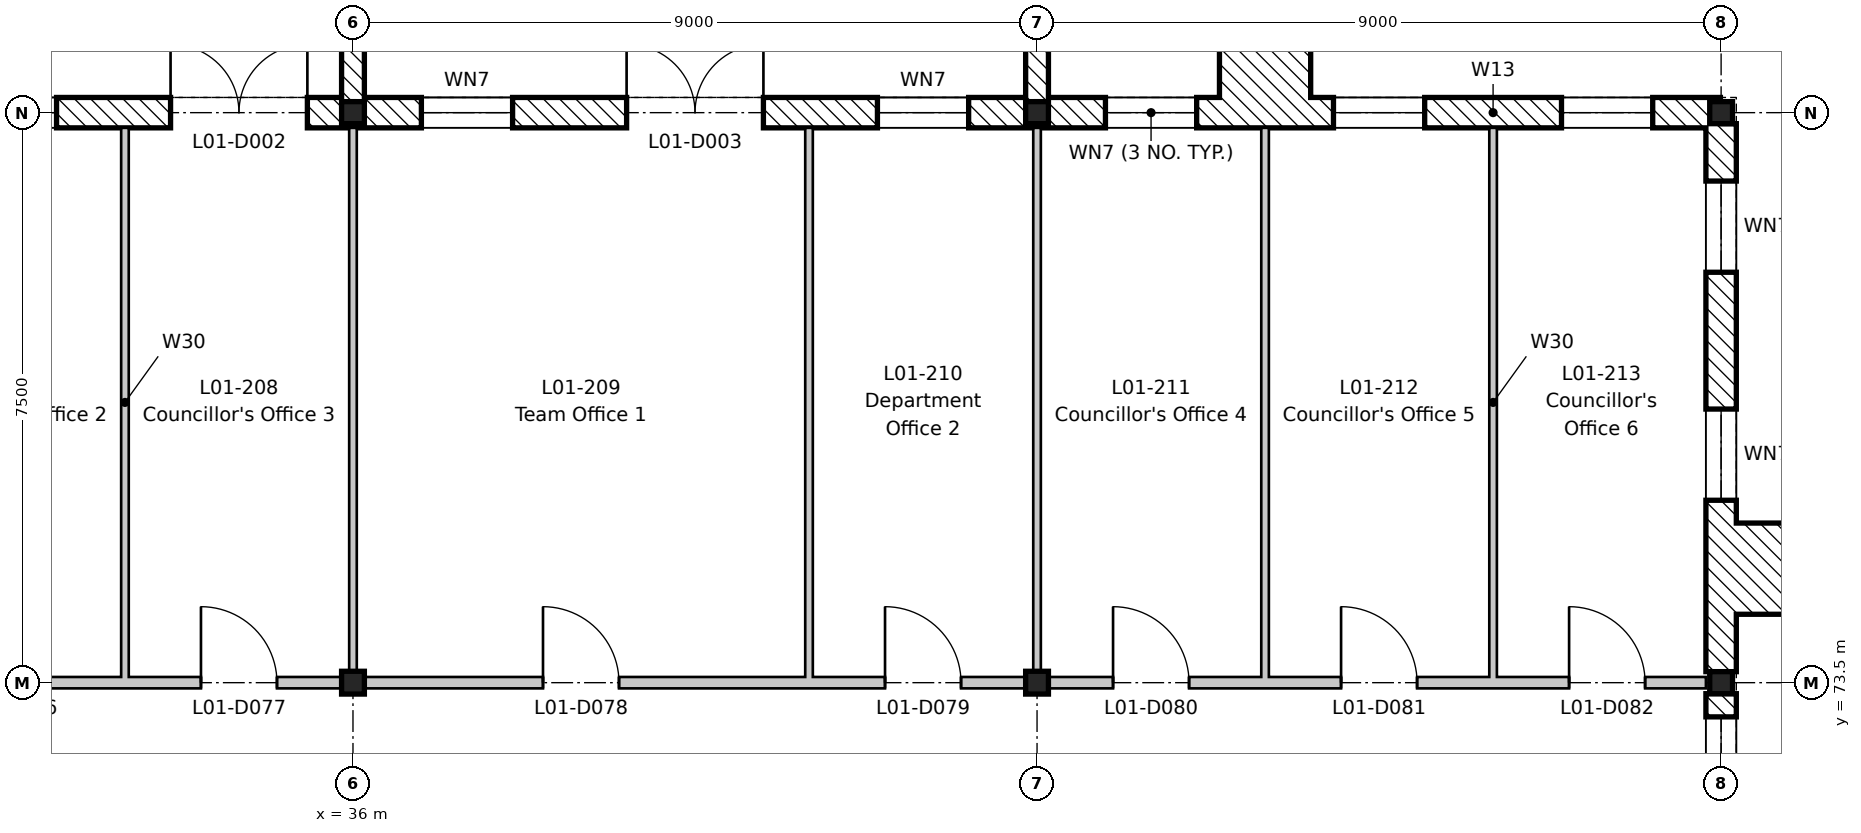
"""IFC4 building model, lengths in metres.
Left out: names, types, materials, properties, quantities, classifications, styles, units other than length and angle.
Written with IfcOpenShell. Run it as: python <this file> out.ifc"""

import sys

from ifc_helpers import new_model, si_unit, direction, frame, frame_2d, origin, origin_2d, place, context, subcontext, project, spatial, rectangle, i_section, extrude, element, fill, save


model = new_model("IFC4")
c1 = context("Model", 3, precision=1e-05, world=origin(), true_north=direction((0.0, 1.0)))
c2 = subcontext(c1, "Body", "Model", "MODEL_VIEW")
j1 = project(units=[si_unit("LENGTHUNIT", "METRE"), si_unit("PLANEANGLEUNIT", "RADIAN")], contexts=[c1])
p1 = place(None, origin())
s1 = spatial("IfcSite", under=j1, at=p1, CompositionType="ELEMENT")
p2 = place(p1, origin())
s2 = spatial("IfcBuilding", under=s1, at=p2, CompositionType="ELEMENT")
p3 = place(p2, frame((0.0, 0.0, 5.4)))
s3 = spatial("IfcBuildingStorey", under=s2, at=p3, CompositionType="ELEMENT", Elevation=5.4)
p4 = place(p3, frame((36.0, 73.5, -0.2), z_axis=(0.0, 0.0, 1.0), x_axis=(1.0, 0.0, 0.0)))
e1 = element("IfcColumn", 1, at=p4, inside=s3, PredefinedType="COLUMN", context=c2, shape_type="SweptSolid", body=[
    extrude(i_section(OverallWidth=0.3, OverallDepth=0.3, WebThickness=0.011, FlangeThickness=0.019, FilletRadius=0.027, at=origin_2d()), origin(), (0.0, 0.0, 1.0), 4.5),
])
p5 = place(p3, frame((36.0, 81.0, -0.2), z_axis=(0.0, 0.0, 1.0), x_axis=(1.0, 0.0, 0.0)))
e2 = element("IfcColumn", 2, at=p5, inside=s3, PredefinedType="COLUMN", context=c2, shape_type="SweptSolid", body=[
    extrude(i_section(OverallWidth=0.3, OverallDepth=0.29, WebThickness=0.009, FlangeThickness=0.014, FilletRadius=0.027, at=origin_2d()), origin(), (0.0, 0.0, 1.0), 4.5),
])
p6 = place(p3, frame((45.0, 73.5, -0.2), z_axis=(0.0, 0.0, 1.0), x_axis=(1.0, 0.0, 0.0)))
e3 = element("IfcColumn", 3, at=p6, inside=s3, PredefinedType="COLUMN", context=c2, shape_type="SweptSolid", body=[
    extrude(i_section(OverallWidth=0.3, OverallDepth=0.3, WebThickness=0.011, FlangeThickness=0.019, FilletRadius=0.027, at=origin_2d()), origin(), (0.0, 0.0, 1.0), 4.5),
])
for number, where, z_axis, x_axis in (
    (4, (45.0, 81.0, -0.2), (0.0, 0.0, 1.0), (1.0, 0.0, 0.0)),
    (5, (54.0, 73.5, -0.2), (0.0, 0.0, 1.0), (1.0, 0.0, 0.0)),
    (6, (54.0, 81.0, -0.2), (0.0, 0.0, 1.0), (1.0, 0.0, 0.0)),
):
    element("IfcColumn", number, at=place(p3, frame(where, z_axis=z_axis, x_axis=x_axis)), inside=s3, PredefinedType="COLUMN", context=c2, shape_type="SweptSolid", body=[
        extrude(i_section(OverallWidth=0.3, OverallDepth=0.29, WebThickness=0.009, FlangeThickness=0.014, FilletRadius=0.027, at=origin_2d()), origin(), (0.0, 0.0, 1.0), 4.5),
    ])
p7 = place(p3, frame((27.009, 81.0, 0.0), z_axis=(0.0, 0.0, 1.0), x_axis=(1.0, 0.0, 0.0)))
e7 = element("IfcWall", 7, at=p7, inside=s3, PredefinedType="STANDARD", context=c2, shape_type="SweptSolid", body=[
    extrude(rectangle(XDim=8.981, YDim=0.4, at=frame_2d((4.491, 0.0))), origin(), (0.0, 0.0, 1.0), 3.9),
])
p8 = place(p7, frame((6.591, 0.0, 0.0)))
e8 = element("IfcOpeningElement", 8, at=p8, cuts=e7, PredefinedType="OPENING", context=c2, shape_type="SweptSolid", body=[
    extrude(rectangle(XDim=1.8, YDim=2.4, at=frame_2d((0.9, 1.2))), frame((0.0, 0.21, 0.0), z_axis=(0.0, -1.0, 0.0), x_axis=(1.0, 0.0, 0.0)), (0.0, 0.0, 1.0), 0.42),
])
p9 = place(p7, frame((0.891, 0.0, 0.9)))
e9 = element("IfcOpeningElement", 9, at=p9, cuts=e7, PredefinedType="OPENING", context=c2, shape_type="SweptSolid", body=[
    extrude(rectangle(XDim=1.2, YDim=2.4, at=frame_2d((0.6, 1.2))), frame((0.0, 0.21, 0.0), z_axis=(0.0, -1.0, 0.0), x_axis=(1.0, 0.0, 0.0)), (0.0, 0.0, 1.0), 0.42),
])
p10 = place(p7, frame((3.891, 0.0, 0.9)))
e10 = element("IfcOpeningElement", 10, at=p10, cuts=e7, PredefinedType="OPENING", context=c2, shape_type="SweptSolid", body=[
    extrude(rectangle(XDim=1.2, YDim=2.4, at=frame_2d((0.6, 1.2))), frame((0.0, 0.21, 0.0), z_axis=(0.0, -1.0, 0.0), x_axis=(1.0, 0.0, 0.0)), (0.0, 0.0, 1.0), 0.42),
])
p11 = place(p3, frame((36.009, 81.0, 0.0), z_axis=(0.0, 0.0, 1.0), x_axis=(1.0, 0.0, 0.0)))
e11 = element("IfcWall", 11, at=p11, inside=s3, PredefinedType="STANDARD", context=c2, shape_type="SweptSolid", body=[
    extrude(rectangle(XDim=8.981, YDim=0.4, at=frame_2d((4.491, 0.0))), origin(), (0.0, 0.0, 1.0), 3.9),
])
p12 = place(p11, frame((3.591, 0.0, 0.0)))
e12 = element("IfcOpeningElement", 12, at=p12, cuts=e11, PredefinedType="OPENING", context=c2, shape_type="SweptSolid", body=[
    extrude(rectangle(XDim=1.8, YDim=2.4, at=frame_2d((0.9, 1.2))), frame((0.0, 0.21, 0.0), z_axis=(0.0, -1.0, 0.0), x_axis=(1.0, 0.0, 0.0)), (0.0, 0.0, 1.0), 0.42),
])
p13 = place(p11, frame((0.891, 0.0, 0.9)))
e13 = element("IfcOpeningElement", 13, at=p13, cuts=e11, PredefinedType="OPENING", context=c2, shape_type="SweptSolid", body=[
    extrude(rectangle(XDim=1.2, YDim=2.4, at=frame_2d((0.6, 1.2))), frame((0.0, 0.21, 0.0), z_axis=(0.0, -1.0, 0.0), x_axis=(1.0, 0.0, 0.0)), (0.0, 0.0, 1.0), 0.42),
])
p14 = place(p11, frame((6.891, 0.0, 0.9)))
e14 = element("IfcOpeningElement", 14, at=p14, cuts=e11, PredefinedType="OPENING", context=c2, shape_type="SweptSolid", body=[
    extrude(rectangle(XDim=1.2, YDim=2.4, at=frame_2d((0.6, 1.2))), frame((0.0, 0.21, 0.0), z_axis=(0.0, -1.0, 0.0), x_axis=(1.0, 0.0, 0.0)), (0.0, 0.0, 1.0), 0.42),
])
p15 = place(p3, frame((45.009, 81.0, 0.0), z_axis=(0.0, 0.0, 1.0), x_axis=(1.0, 0.0, 0.0)))
e15 = element("IfcWall", 15, at=p15, inside=s3, PredefinedType="STANDARD", context=c2, shape_type="SweptSolid", body=[
    extrude(rectangle(XDim=8.981, YDim=0.4, at=frame_2d((4.491, 0.0))), origin(), (0.0, 0.0, 1.0), 3.9),
])
p16 = place(p15, frame((0.891, 0.0, 0.9)))
e16 = element("IfcOpeningElement", 16, at=p16, cuts=e15, PredefinedType="OPENING", context=c2, shape_type="SweptSolid", body=[
    extrude(rectangle(XDim=1.2, YDim=2.4, at=frame_2d((0.6, 1.2))), frame((0.0, 0.21, 0.0), z_axis=(0.0, -1.0, 0.0), x_axis=(1.0, 0.0, 0.0)), (0.0, 0.0, 1.0), 0.42),
])
p17 = place(p15, frame((3.891, 0.0, 0.9)))
e17 = element("IfcOpeningElement", 17, at=p17, cuts=e15, PredefinedType="OPENING", context=c2, shape_type="SweptSolid", body=[
    extrude(rectangle(XDim=1.2, YDim=2.4, at=frame_2d((0.6, 1.2))), frame((0.0, 0.21, 0.0), z_axis=(0.0, -1.0, 0.0), x_axis=(1.0, 0.0, 0.0)), (0.0, 0.0, 1.0), 0.42),
])
p18 = place(p15, frame((6.891, 0.0, 0.9)))
e18 = element("IfcOpeningElement", 18, at=p18, cuts=e15, PredefinedType="OPENING", context=c2, shape_type="SweptSolid", body=[
    extrude(rectangle(XDim=1.2, YDim=2.4, at=frame_2d((0.6, 1.2))), frame((0.0, 0.21, 0.0), z_axis=(0.0, -1.0, 0.0), x_axis=(1.0, 0.0, 0.0)), (0.0, 0.0, 1.0), 0.42),
])
p19 = place(p3, frame((54.0, 73.355, 0.0), z_axis=(0.0, 0.0, 1.0), x_axis=(0.0, -1.0, 0.0)))
e19 = element("IfcWall", 19, at=p19, inside=s3, PredefinedType="STANDARD", context=c2, shape_type="SweptSolid", body=[
    extrude(rectangle(XDim=2.71, YDim=0.4, at=frame_2d((1.355, 0.0))), origin(), (0.0, 0.0, 1.0), 4.1),
])
p20 = place(p19, frame((0.305, 0.0, 0.9)))
e20 = element("IfcOpeningElement", 20, at=p20, cuts=e19, PredefinedType="OPENING", context=c2, shape_type="SweptSolid", body=[
    extrude(rectangle(XDim=2.1, YDim=2.1, at=frame_2d((1.05, 1.05))), frame((0.0, 0.21, 0.0), z_axis=(0.0, -1.0, 0.0), x_axis=(1.0, 0.0, 0.0)), (0.0, 0.0, 1.0), 0.42),
])
p21 = place(p3, frame((54.0, 80.855, 0.0), z_axis=(0.0, 0.0, 1.0), x_axis=(0.0, -1.0, 0.0)))
e21 = element("IfcWall", 21, at=p21, inside=s3, PredefinedType="STANDARD", context=c2, shape_type="SweptSolid", body=[
    extrude(rectangle(XDim=7.21, YDim=0.4, at=frame_2d((3.605, 0.0))), origin(), (0.0, 0.0, 1.0), 3.97),
])
p22 = place(p21, frame((3.755, 0.0, 0.9)))
e22 = element("IfcOpeningElement", 22, at=p22, cuts=e21, PredefinedType="OPENING", context=c2, shape_type="SweptSolid", body=[
    extrude(rectangle(XDim=1.2, YDim=2.4, at=frame_2d((0.6, 1.2))), frame((0.0, 0.21, 0.0), z_axis=(0.0, -1.0, 0.0), x_axis=(1.0, 0.0, 0.0)), (0.0, 0.0, 1.0), 0.42),
])
p23 = place(p21, frame((0.755, 0.0, 0.9)))
e23 = element("IfcOpeningElement", 23, at=p23, cuts=e21, PredefinedType="OPENING", context=c2, shape_type="SweptSolid", body=[
    extrude(rectangle(XDim=1.2, YDim=2.4, at=frame_2d((0.6, 1.2))), frame((0.0, 0.21, 0.0), z_axis=(0.0, -1.0, 0.0), x_axis=(1.0, 0.0, 0.0)), (0.0, 0.0, 1.0), 0.42),
])
for number, where, z_axis, x_axis in (
    (24, (47.4, 81.8, 0.0), (0.0, 0.0, 1.0), (1.0, 0.0, 0.0)),
    (25, (54.8, 74.4, 0.0), (0.0, 0.0, 1.0), (0.0, 1.0, 0.0)),
):
    element("IfcWall", number, at=place(p3, frame(where, z_axis=z_axis, x_axis=x_axis)), inside=s3, PredefinedType="STANDARD", context=c2, shape_type="SweptSolid", body=[
        extrude(rectangle(XDim=1.2, YDim=1.2, at=frame_2d((0.6, 0.0))), origin(), (0.0, 0.0, 1.0), 4.5),
    ])
for number, where, z_axis, x_axis in (
    (26, (36.0, 81.145, 0.0), (0.0, 0.0, 1.0), (0.0, 1.0, 0.0)),
    (27, (45.0, 81.145, 0.0), (0.0, 0.0, 1.0), (0.0, 1.0, 0.0)),
):
    element("IfcWall", number, at=place(p3, frame(where, z_axis=z_axis, x_axis=x_axis)), inside=s3, PredefinedType="STANDARD", context=c2, shape_type="SweptSolid", body=[
        extrude(rectangle(XDim=2.855, YDim=0.3, at=frame_2d((1.427, 0.0))), origin(), (0.0, 0.0, 1.0), 3.97),
    ])
p24 = place(p3, frame((33.0, 73.575, 0.0), z_axis=(0.0, 0.0, 1.0), x_axis=(0.0, 1.0, 0.0)))
e28 = element("IfcWall", 28, at=p24, inside=s3, PredefinedType="PARTITIONING", context=c2, shape_type="SweptSolid", body=[
    extrude(rectangle(XDim=7.225, YDim=0.1, at=frame_2d((3.613, 0.0))), origin(), (0.0, 0.0, 1.0), 4.3),
])
p25 = place(p3, frame((36.0, 73.575, 0.0), z_axis=(0.0, 0.0, 1.0), x_axis=(0.0, 1.0, 0.0)))
e29 = element("IfcWall", 29, at=p25, inside=s3, PredefinedType="PARTITIONING", context=c2, shape_type="SweptSolid", body=[
    extrude(rectangle(XDim=7.225, YDim=0.1, at=frame_2d((3.613, 0.0))), origin(), (0.0, 0.0, 1.0), 3.95),
])
p26 = place(p3, frame((42.0, 73.575, 0.0), z_axis=(0.0, 0.0, 1.0), x_axis=(0.0, 1.0, 0.0)))
e30 = element("IfcWall", 30, at=p26, inside=s3, PredefinedType="PARTITIONING", context=c2, shape_type="SweptSolid", body=[
    extrude(rectangle(XDim=7.225, YDim=0.1, at=frame_2d((3.613, 0.0))), origin(), (0.0, 0.0, 1.0), 4.3),
])
p27 = place(p3, frame((45.0, 73.575, 0.0), z_axis=(0.0, 0.0, 1.0), x_axis=(0.0, 1.0, 0.0)))
e31 = element("IfcWall", 31, at=p27, inside=s3, PredefinedType="PARTITIONING", context=c2, shape_type="SweptSolid", body=[
    extrude(rectangle(XDim=7.225, YDim=0.1, at=frame_2d((3.613, 0.0))), origin(), (0.0, 0.0, 1.0), 3.95),
])
for number, where, z_axis, x_axis in (
    (32, (48.0, 73.575, 0.0), (0.0, 0.0, 1.0), (0.0, 1.0, 0.0)),
    (33, (51.0, 73.575, 0.0), (0.0, 0.0, 1.0), (0.0, 1.0, 0.0)),
):
    element("IfcWall", number, at=place(p3, frame(where, z_axis=z_axis, x_axis=x_axis)), inside=s3, PredefinedType="PARTITIONING", context=c2, shape_type="SweptSolid", body=[
        extrude(rectangle(XDim=7.225, YDim=0.1, at=frame_2d((3.613, 0.0))), origin(), (0.0, 0.0, 1.0), 4.3),
    ])
p28 = place(p3, frame((18.0, 73.5, 0.0), z_axis=(0.0, 0.0, 1.0), x_axis=(1.0, 0.0, 0.0)))
e34 = element("IfcWall", 34, at=p28, inside=s3, PredefinedType="PARTITIONING", context=c2, shape_type="SweptSolid", body=[
    extrude(rectangle(XDim=35.8, YDim=0.15, at=frame_2d((17.9, 0.0))), origin(), (0.0, 0.0, 1.0), 3.78),
])
p29 = place(p28, frame((10.3, 0.0, 0.0)))
e35 = element("IfcOpeningElement", 35, at=p29, cuts=e34, PredefinedType="OPENING", context=c2, shape_type="SweptSolid", body=[
    extrude(rectangle(XDim=1.4, YDim=2.1, at=frame_2d((0.7, 1.05))), frame((0.0, 0.085, 0.0), z_axis=(0.0, -1.0, 0.0), x_axis=(1.0, 0.0, 0.0)), (0.0, 0.0, 1.0), 0.17),
])
p30 = place(p28, frame((13.0, 0.0, 0.0)))
e36 = element("IfcOpeningElement", 36, at=p30, cuts=e34, PredefinedType="OPENING", context=c2, shape_type="SweptSolid", body=[
    extrude(rectangle(XDim=1.0, YDim=2.1, at=frame_2d((0.5, 1.05))), frame((0.0, 0.085, 0.0), z_axis=(0.0, -1.0, 0.0), x_axis=(1.0, 0.0, 0.0)), (0.0, 0.0, 1.0), 0.17),
])
p31 = place(p28, frame((16.0, 0.0, 0.0)))
e37 = element("IfcOpeningElement", 37, at=p31, cuts=e34, PredefinedType="OPENING", context=c2, shape_type="SweptSolid", body=[
    extrude(rectangle(XDim=1.0, YDim=2.1, at=frame_2d((0.5, 1.05))), frame((0.0, 0.085, 0.0), z_axis=(0.0, -1.0, 0.0), x_axis=(1.0, 0.0, 0.0)), (0.0, 0.0, 1.0), 0.17),
])
p32 = place(p28, frame((20.5, 0.0, 0.0)))
e38 = element("IfcOpeningElement", 38, at=p32, cuts=e34, PredefinedType="OPENING", context=c2, shape_type="SweptSolid", body=[
    extrude(rectangle(XDim=1.0, YDim=2.1, at=frame_2d((0.5, 1.05))), frame((0.0, 0.085, 0.0), z_axis=(0.0, -1.0, 0.0), x_axis=(1.0, 0.0, 0.0)), (0.0, 0.0, 1.0), 0.17),
])
p33 = place(p28, frame((25.0, 0.0, 0.0)))
e39 = element("IfcOpeningElement", 39, at=p33, cuts=e34, PredefinedType="OPENING", context=c2, shape_type="SweptSolid", body=[
    extrude(rectangle(XDim=1.0, YDim=2.1, at=frame_2d((0.5, 1.05))), frame((0.0, 0.085, 0.0), z_axis=(0.0, -1.0, 0.0), x_axis=(1.0, 0.0, 0.0)), (0.0, 0.0, 1.0), 0.17),
])
p34 = place(p28, frame((28.0, 0.0, 0.0)))
e40 = element("IfcOpeningElement", 40, at=p34, cuts=e34, PredefinedType="OPENING", context=c2, shape_type="SweptSolid", body=[
    extrude(rectangle(XDim=1.0, YDim=2.1, at=frame_2d((0.5, 1.05))), frame((0.0, 0.085, 0.0), z_axis=(0.0, -1.0, 0.0), x_axis=(1.0, 0.0, 0.0)), (0.0, 0.0, 1.0), 0.17),
])
p35 = place(p28, frame((31.0, 0.0, 0.0)))
e41 = element("IfcOpeningElement", 41, at=p35, cuts=e34, PredefinedType="OPENING", context=c2, shape_type="SweptSolid", body=[
    extrude(rectangle(XDim=1.0, YDim=2.1, at=frame_2d((0.5, 1.05))), frame((0.0, 0.085, 0.0), z_axis=(0.0, -1.0, 0.0), x_axis=(1.0, 0.0, 0.0)), (0.0, 0.0, 1.0), 0.17),
])
p36 = place(p28, frame((34.0, 0.0, 0.0)))
e42 = element("IfcOpeningElement", 42, at=p36, cuts=e34, PredefinedType="OPENING", context=c2, shape_type="SweptSolid", body=[
    extrude(rectangle(XDim=1.0, YDim=2.1, at=frame_2d((0.5, 1.05))), frame((0.0, 0.085, 0.0), z_axis=(0.0, -1.0, 0.0), x_axis=(1.0, 0.0, 0.0)), (0.0, 0.0, 1.0), 0.17),
])
p37 = place(p8, origin())
e43 = element("IfcDoor", 43, at=p37, inside=s3, OperationType="DOUBLE_DOOR_SINGLE_SWING", PredefinedType="DOOR", context=c2, shape_type="SweptSolid", body=[
    extrude(rectangle(XDim=1.8, YDim=2.4, at=frame_2d((0.9, 1.2))), frame((0.0, 0.025, 0.0), z_axis=(0.0, -1.0, 0.0), x_axis=(1.0, 0.0, 0.0)), (0.0, 0.0, 1.0), 0.05),
])
fill(e8, e43)
p38 = place(p10, origin())
e44 = element("IfcWindow", 44, at=p38, inside=s3, PartitioningType="SINGLE_PANEL", PredefinedType="WINDOW", context=c2, shape_type="SweptSolid", body=[
    extrude(rectangle(XDim=1.2, YDim=2.4, at=frame_2d((0.6, 1.2))), frame((0.0, -0.12, 0.0), z_axis=(0.0, -1.0, 0.0), x_axis=(1.0, 0.0, 0.0)), (0.0, 0.0, 1.0), 0.06),
])
fill(e10, e44)
p39 = place(p12, origin())
e45 = element("IfcDoor", 45, at=p39, inside=s3, OperationType="DOUBLE_DOOR_SINGLE_SWING", PredefinedType="DOOR", context=c2, shape_type="SweptSolid", body=[
    extrude(rectangle(XDim=1.8, YDim=2.4, at=frame_2d((0.9, 1.2))), frame((0.0, 0.025, 0.0), z_axis=(0.0, -1.0, 0.0), x_axis=(1.0, 0.0, 0.0)), (0.0, 0.0, 1.0), 0.05),
])
fill(e12, e45)
p40 = place(p13, origin())
e46 = element("IfcWindow", 46, at=p40, inside=s3, PartitioningType="SINGLE_PANEL", PredefinedType="WINDOW", context=c2, shape_type="SweptSolid", body=[
    extrude(rectangle(XDim=1.2, YDim=2.4, at=frame_2d((0.6, 1.2))), frame((0.0, -0.12, 0.0), z_axis=(0.0, -1.0, 0.0), x_axis=(1.0, 0.0, 0.0)), (0.0, 0.0, 1.0), 0.06),
])
fill(e13, e46)
p41 = place(p14, origin())
e47 = element("IfcWindow", 47, at=p41, inside=s3, PartitioningType="SINGLE_PANEL", PredefinedType="WINDOW", context=c2, shape_type="SweptSolid", body=[
    extrude(rectangle(XDim=1.2, YDim=2.4, at=frame_2d((0.6, 1.2))), frame((0.0, -0.12, 0.0), z_axis=(0.0, -1.0, 0.0), x_axis=(1.0, 0.0, 0.0)), (0.0, 0.0, 1.0), 0.06),
])
fill(e14, e47)
p42 = place(p16, origin())
e48 = element("IfcWindow", 48, at=p42, inside=s3, PartitioningType="SINGLE_PANEL", PredefinedType="WINDOW", context=c2, shape_type="SweptSolid", body=[
    extrude(rectangle(XDim=1.2, YDim=2.4, at=frame_2d((0.6, 1.2))), frame((0.0, -0.12, 0.0), z_axis=(0.0, -1.0, 0.0), x_axis=(1.0, 0.0, 0.0)), (0.0, 0.0, 1.0), 0.06),
])
fill(e16, e48)
p43 = place(p17, origin())
e49 = element("IfcWindow", 49, at=p43, inside=s3, PartitioningType="SINGLE_PANEL", PredefinedType="WINDOW", context=c2, shape_type="SweptSolid", body=[
    extrude(rectangle(XDim=1.2, YDim=2.4, at=frame_2d((0.6, 1.2))), frame((0.0, -0.12, 0.0), z_axis=(0.0, -1.0, 0.0), x_axis=(1.0, 0.0, 0.0)), (0.0, 0.0, 1.0), 0.06),
])
fill(e17, e49)
p44 = place(p18, origin())
e50 = element("IfcWindow", 50, at=p44, inside=s3, PartitioningType="SINGLE_PANEL", PredefinedType="WINDOW", context=c2, shape_type="SweptSolid", body=[
    extrude(rectangle(XDim=1.2, YDim=2.4, at=frame_2d((0.6, 1.2))), frame((0.0, -0.12, 0.0), z_axis=(0.0, -1.0, 0.0), x_axis=(1.0, 0.0, 0.0)), (0.0, 0.0, 1.0), 0.06),
])
fill(e18, e50)
p45 = place(p20, origin())
e51 = element("IfcWindow", 51, at=p45, inside=s3, PartitioningType="SINGLE_PANEL", PredefinedType="WINDOW", context=c2, shape_type="SweptSolid", body=[
    extrude(rectangle(XDim=2.1, YDim=2.1, at=frame_2d((1.05, 1.05))), frame((0.0, -0.12, 0.0), z_axis=(0.0, -1.0, 0.0), x_axis=(1.0, 0.0, 0.0)), (0.0, 0.0, 1.0), 0.06),
])
fill(e20, e51)
p46 = place(p22, origin())
e52 = element("IfcWindow", 52, at=p46, inside=s3, PartitioningType="SINGLE_PANEL", PredefinedType="WINDOW", context=c2, shape_type="SweptSolid", body=[
    extrude(rectangle(XDim=1.2, YDim=2.4, at=frame_2d((0.6, 1.2))), frame((0.0, -0.12, 0.0), z_axis=(0.0, -1.0, 0.0), x_axis=(1.0, 0.0, 0.0)), (0.0, 0.0, 1.0), 0.06),
])
fill(e22, e52)
p47 = place(p23, origin())
e53 = element("IfcWindow", 53, at=p47, inside=s3, PartitioningType="SINGLE_PANEL", PredefinedType="WINDOW", context=c2, shape_type="SweptSolid", body=[
    extrude(rectangle(XDim=1.2, YDim=2.4, at=frame_2d((0.6, 1.2))), frame((0.0, -0.12, 0.0), z_axis=(0.0, -1.0, 0.0), x_axis=(1.0, 0.0, 0.0)), (0.0, 0.0, 1.0), 0.06),
])
fill(e23, e53)
p48 = place(p31, origin())
e54 = element("IfcDoor", 54, at=p48, inside=s3, OperationType="SINGLE_SWING_LEFT", PredefinedType="DOOR", context=c2, shape_type="SweptSolid", body=[
    extrude(rectangle(XDim=1.0, YDim=2.1, at=frame_2d((0.5, 1.05))), frame((0.0, 0.025, 0.0), z_axis=(0.0, -1.0, 0.0), x_axis=(1.0, 0.0, 0.0)), (0.0, 0.0, 1.0), 0.05),
])
fill(e37, e54)
p49 = place(p32, origin())
e55 = element("IfcDoor", 55, at=p49, inside=s3, OperationType="SINGLE_SWING_LEFT", PredefinedType="DOOR", context=c2, shape_type="SweptSolid", body=[
    extrude(rectangle(XDim=1.0, YDim=2.1, at=frame_2d((0.5, 1.05))), frame((0.0, 0.025, 0.0), z_axis=(0.0, -1.0, 0.0), x_axis=(1.0, 0.0, 0.0)), (0.0, 0.0, 1.0), 0.05),
])
fill(e38, e55)
p50 = place(p33, origin())
e56 = element("IfcDoor", 56, at=p50, inside=s3, OperationType="SINGLE_SWING_LEFT", PredefinedType="DOOR", context=c2, shape_type="SweptSolid", body=[
    extrude(rectangle(XDim=1.0, YDim=2.1, at=frame_2d((0.5, 1.05))), frame((0.0, 0.025, 0.0), z_axis=(0.0, -1.0, 0.0), x_axis=(1.0, 0.0, 0.0)), (0.0, 0.0, 1.0), 0.05),
])
fill(e39, e56)
p51 = place(p34, origin())
e57 = element("IfcDoor", 57, at=p51, inside=s3, OperationType="SINGLE_SWING_LEFT", PredefinedType="DOOR", context=c2, shape_type="SweptSolid", body=[
    extrude(rectangle(XDim=1.0, YDim=2.1, at=frame_2d((0.5, 1.05))), frame((0.0, 0.025, 0.0), z_axis=(0.0, -1.0, 0.0), x_axis=(1.0, 0.0, 0.0)), (0.0, 0.0, 1.0), 0.05),
])
fill(e40, e57)
p52 = place(p35, origin())
e58 = element("IfcDoor", 58, at=p52, inside=s3, OperationType="SINGLE_SWING_LEFT", PredefinedType="DOOR", context=c2, shape_type="SweptSolid", body=[
    extrude(rectangle(XDim=1.0, YDim=2.1, at=frame_2d((0.5, 1.05))), frame((0.0, 0.025, 0.0), z_axis=(0.0, -1.0, 0.0), x_axis=(1.0, 0.0, 0.0)), (0.0, 0.0, 1.0), 0.05),
])
fill(e41, e58)
p53 = place(p36, origin())
e59 = element("IfcDoor", 59, at=p53, inside=s3, OperationType="SINGLE_SWING_LEFT", PredefinedType="DOOR", context=c2, shape_type="SweptSolid", body=[
    extrude(rectangle(XDim=1.0, YDim=2.1, at=frame_2d((0.5, 1.05))), frame((0.0, 0.025, 0.0), z_axis=(0.0, -1.0, 0.0), x_axis=(1.0, 0.0, 0.0)), (0.0, 0.0, 1.0), 0.05),
])
fill(e42, e59)
save(model, sys.argv[1])
